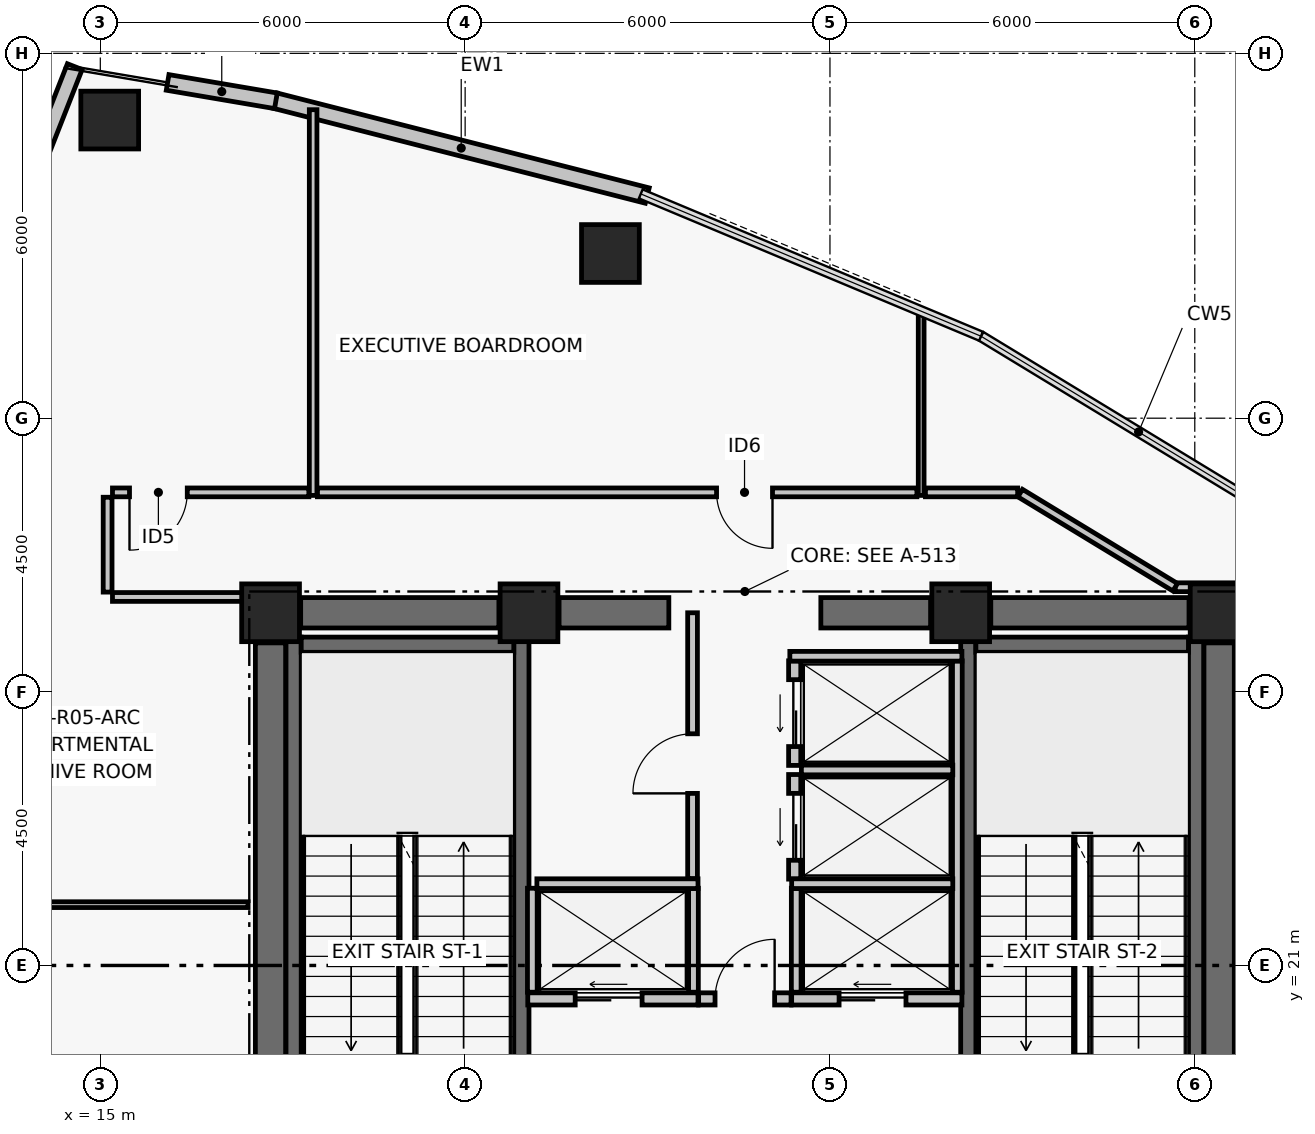
"""IFC4 building model, lengths in metres.
Left out: names, types, materials, properties, quantities, classifications, styles, units other than length and angle.
Written with IfcOpenShell. Run it as: python <this file> out.ifc"""

import sys

from ifc_helpers import new_model, si_unit, direction, frame, frame_2d, origin, origin_2d, place, context, subcontext, project, spatial, rectangle, hollow_rectangle, extrude, element, fill, save


model = new_model("IFC4")
c1 = context("Model", 3, precision=1e-05, world=origin(), true_north=direction((0.0, 1.0)))
c2 = subcontext(c1, "Body", "Model", "MODEL_VIEW")
j1 = project(units=[si_unit("LENGTHUNIT", "METRE"), si_unit("PLANEANGLEUNIT", "RADIAN")], contexts=[c1])
p1 = place(None, origin())
s1 = spatial("IfcSite", under=j1, at=p1, CompositionType="ELEMENT")
p2 = place(p1, origin())
s2 = spatial("IfcBuilding", under=s1, at=p2, CompositionType="ELEMENT")
p3 = place(p2, frame((0.0, 0.0, 187.8)))
s3 = spatial("IfcBuildingStorey", under=s2, at=p3, CompositionType="ELEMENT", Elevation=187.8)
for number, where, z_axis, x_axis in (
    (1, (17.8, 26.8, 0.0), (0.0, 0.0, 1.0), (1.0, 0.0, 0.0)),
    (2, (22.05, 26.8, 0.0), (0.0, 0.0, 1.0), (1.0, 0.0, 0.0)),
    (3, (29.15, 26.8, 0.0), (0.0, 0.0, 1.0), (1.0, 0.0, 0.0)),
    (4, (33.4, 26.8, 0.0), (0.0, 0.0, 1.0), (1.0, 0.0, 0.0)),
):
    element("IfcColumn", number, at=place(p3, frame(where, z_axis=z_axis, x_axis=x_axis)), inside=s3, PredefinedType="COLUMN", context=c2, shape_type="SweptSolid", body=[
        extrude(rectangle(XDim=0.95, YDim=0.95, at=origin_2d()), origin(), (0.0, 0.0, 1.0), 3.72),
    ])
p4 = place(p3, frame((18.295, 26.8, 0.0), z_axis=(0.0, 0.0, 1.0), x_axis=(1.0, 0.0, 0.0)))
e5 = element("IfcWall", 5, at=p4, inside=s3, PredefinedType="SHEAR", context=c2, shape_type="SweptSolid", body=[
    extrude(rectangle(XDim=3.26, YDim=0.5, at=frame_2d((1.63, 0.0))), origin(), (0.0, 0.0, 1.0), 3.5),
])
p5 = place(p3, frame((22.545, 26.8, 0.0), z_axis=(0.0, 0.0, 1.0), x_axis=(1.0, 0.0, 0.0)))
e6 = element("IfcWall", 6, at=p5, inside=s3, PredefinedType="SHEAR", context=c2, shape_type="SweptSolid", body=[
    extrude(rectangle(XDim=1.805, YDim=0.5, at=frame_2d((0.903, 0.0))), origin(), (0.0, 0.0, 1.0), 3.5),
])
p6 = place(p3, frame((26.85, 26.8, 0.0), z_axis=(0.0, 0.0, 1.0), x_axis=(1.0, 0.0, 0.0)))
e7 = element("IfcWall", 7, at=p6, inside=s3, PredefinedType="SHEAR", context=c2, shape_type="SweptSolid", body=[
    extrude(rectangle(XDim=1.805, YDim=0.5, at=frame_2d((0.902, 0.0))), origin(), (0.0, 0.0, 1.0), 3.5),
])
p7 = place(p3, frame((29.645, 26.8, 0.0), z_axis=(0.0, 0.0, 1.0), x_axis=(1.0, 0.0, 0.0)))
e8 = element("IfcWall", 8, at=p7, inside=s3, PredefinedType="SHEAR", context=c2, shape_type="SweptSolid", body=[
    extrude(rectangle(XDim=3.26, YDim=0.5, at=frame_2d((1.63, 0.0))), origin(), (0.0, 0.0, 1.0), 3.5),
])
for number, where, z_axis, x_axis in (
    (9, (17.8, 17.695, 0.0), (0.0, 0.0, 1.0), (0.0, 1.0, 0.0)),
    (10, (33.4, 17.695, 0.0), (0.0, 0.0, 1.0), (0.0, 1.0, 0.0)),
):
    element("IfcWall", number, at=place(p3, frame(where, z_axis=z_axis, x_axis=x_axis)), inside=s3, PredefinedType="SHEAR", context=c2, shape_type="SweptSolid", body=[
        extrude(rectangle(XDim=8.61, YDim=0.5, at=frame_2d((4.305, 0.0))), origin(), (0.0, 0.0, 1.0), 3.5),
    ])
p8 = place(p3, frame((18.179, 17.6, 0.0), z_axis=(0.0, 0.0, 1.0), x_axis=(0.0, 1.0, 0.0)))
e11 = element("IfcWall", 11, at=p8, inside=s3, PredefinedType="SHEAR", context=c2, shape_type="SweptSolid", body=[
    extrude(rectangle(XDim=8.8, YDim=0.25, at=frame_2d((4.4, 0.0))), origin(), (0.0, 0.0, 1.0), 3.5),
])
p9 = place(p3, frame((21.925, 17.6, 0.0), z_axis=(0.0, 0.0, 1.0), x_axis=(0.0, 1.0, 0.0)))
e12 = element("IfcWall", 12, at=p9, inside=s3, PredefinedType="SHEAR", context=c2, shape_type="SweptSolid", body=[
    extrude(rectangle(XDim=8.8, YDim=0.25, at=frame_2d((4.4, 0.0))), origin(), (0.0, 0.0, 1.0), 3.5),
])
p10 = place(p9, frame((0.35, 0.0, 0.0)))
e13 = element("IfcOpeningElement", 13, at=p10, cuts=e12, PredefinedType="OPENING", context=c2, shape_type="SweptSolid", body=[
    extrude(rectangle(XDim=1.05, YDim=2.08, at=frame_2d((0.525, 1.04))), frame((0.0, 0.135, 0.0), z_axis=(0.0, -1.0, 0.0), x_axis=(1.0, 0.0, 0.0)), (0.0, 0.0, 1.0), 0.27),
])
p11 = place(p3, frame((18.304, 26.275, 0.0), z_axis=(0.0, 0.0, 1.0), x_axis=(1.0, 0.0, 0.0)))
e14 = element("IfcWall", 14, at=p11, inside=s3, PredefinedType="SHEAR", context=c2, shape_type="SweptSolid", body=[
    extrude(rectangle(XDim=3.496, YDim=0.25, at=frame_2d((1.748, 0.0))), origin(), (0.0, 0.0, 1.0), 3.5),
])
p12 = place(p3, frame((29.275, 17.6, 0.0), z_axis=(0.0, 0.0, 1.0), x_axis=(0.0, 1.0, 0.0)))
e15 = element("IfcWall", 15, at=p12, inside=s3, PredefinedType="SHEAR", context=c2, shape_type="SweptSolid", body=[
    extrude(rectangle(XDim=8.8, YDim=0.25, at=frame_2d((4.4, 0.0))), origin(), (0.0, 0.0, 1.0), 3.5),
])
p13 = place(p12, frame((0.35, 0.0, 0.0)))
e16 = element("IfcOpeningElement", 16, at=p13, cuts=e15, PredefinedType="OPENING", context=c2, shape_type="SweptSolid", body=[
    extrude(rectangle(XDim=1.05, YDim=2.08, at=frame_2d((0.525, 1.04))), frame((0.0, 0.135, 0.0), z_axis=(0.0, -1.0, 0.0), x_axis=(1.0, 0.0, 0.0)), (0.0, 0.0, 1.0), 0.27),
])
p14 = place(p3, frame((33.021, 17.6, 0.0), z_axis=(0.0, 0.0, 1.0), x_axis=(0.0, 1.0, 0.0)))
e17 = element("IfcWall", 17, at=p14, inside=s3, PredefinedType="SHEAR", context=c2, shape_type="SweptSolid", body=[
    extrude(rectangle(XDim=8.8, YDim=0.25, at=frame_2d((4.4, 0.0))), origin(), (0.0, 0.0, 1.0), 3.5),
])
p15 = place(p3, frame((29.4, 26.275, 0.0), z_axis=(0.0, 0.0, 1.0), x_axis=(1.0, 0.0, 0.0)))
e18 = element("IfcWall", 18, at=p15, inside=s3, PredefinedType="SHEAR", context=c2, shape_type="SweptSolid", body=[
    extrude(rectangle(XDim=3.496, YDim=0.25, at=frame_2d((1.748, 0.0))), origin(), (0.0, 0.0, 1.0), 3.5),
])
for number, where, z_axis, x_axis in (
    (19, (23.389, 32.708, 0.0), (0.0, 0.0, 1.0), (1.0, 0.0, 0.0)),
    (20, (15.155, 34.903, 0.0), (0.0, 0.0, 1.0), (1.0, 0.0, 0.0)),
):
    element("IfcColumn", number, at=place(p3, frame(where, z_axis=z_axis, x_axis=x_axis)), inside=s3, PredefinedType="COLUMN", context=c2, shape_type="SweptSolid", body=[
        extrude(hollow_rectangle(XDim=0.95, YDim=0.95, WallThickness=0.04, at=origin_2d()), origin(), (0.0, 0.0, 1.0), 3.72),
    ])
p16 = place(p3, frame((17.876, 35.222, 0.0), z_axis=(0.0, 0.0, 1.0), x_axis=(0.968976240439, -0.247153890246, 0.0)))
e21 = element("IfcWall", 21, at=p16, inside=s3, PredefinedType="PARTITIONING", context=c2, shape_type="SweptSolid", body=[
    extrude(rectangle(XDim=6.315, YDim=0.26, at=frame_2d((3.157, 0.0))), origin(), (0.0, 0.0, 1.0), 3.5),
])
p17 = place(p3, frame((16.107, 35.522, 0.0), z_axis=(0.0, 0.0, 1.0), x_axis=(0.985877723898, -0.167466753484, 0.0)))
e22 = element("IfcWall", 22, at=p17, inside=s3, PredefinedType="PARTITIONING", context=c2, shape_type="SweptSolid", body=[
    extrude(rectangle(XDim=1.806, YDim=0.26, at=frame_2d((0.903, 0.0))), origin(), (0.0, 0.0, 1.0), 3.5),
])
p18 = place(p3, frame((13.479, 32.979, 0.0), z_axis=(0.0, 0.0, 1.0), x_axis=(0.365609724313, 0.930768246927, 0.0)))
e23 = element("IfcWall", 23, at=p18, inside=s3, PredefinedType="PARTITIONING", context=c2, shape_type="SweptSolid", body=[
    extrude(rectangle(XDim=3.011, YDim=0.26, at=frame_2d((1.505, 0.0))), origin(), (0.0, 0.0, 1.0), 3.5),
])
p19 = place(p3, frame((24.84, 20.45, 0.0), z_axis=(0.0, 0.0, 1.0), x_axis=(1.0, 0.0, 0.0)))
e24 = element("IfcWall", 24, at=p19, inside=s3, PredefinedType="PARTITIONING", context=c2, shape_type="SweptSolid", body=[
    extrude(rectangle(XDim=1.52, YDim=0.2, at=frame_2d((0.76, 0.0))), origin(), (0.0, 0.0, 1.0), 3.5),
])
p20 = place(p19, frame((0.27, 0.0, 0.0)))
e25 = element("IfcOpeningElement", 25, at=p20, cuts=e24, PredefinedType="OPENING", context=c2, shape_type="SweptSolid", body=[
    extrude(rectangle(XDim=0.98, YDim=2.06, at=frame_2d((0.49, 1.03))), frame((0.0, 0.11, 0.0), z_axis=(0.0, -1.0, 0.0), x_axis=(1.0, 0.0, 0.0)), (0.0, 0.0, 1.0), 0.22),
])
p21 = place(p3, frame((22.03, 20.45, 0.0), z_axis=(0.0, 0.0, 1.0), x_axis=(1.0, 0.0, 0.0)))
e26 = element("IfcWall", 26, at=p21, inside=s3, PredefinedType="PARTITIONING", context=c2, shape_type="SweptSolid", body=[
    extrude(rectangle(XDim=2.8, YDim=0.2, at=frame_2d((1.4, 0.0))), origin(), (0.0, 0.0, 1.0), 3.5),
])
p22 = place(p21, frame((0.78, 0.0, 0.0)))
e27 = element("IfcOpeningElement", 27, at=p22, cuts=e26, PredefinedType="OPENING", context=c2, shape_type="SweptSolid", body=[
    extrude(rectangle(XDim=1.1, YDim=2.08, at=frame_2d((0.55, 1.04))), frame((0.0, 0.11, 0.0), z_axis=(0.0, -1.0, 0.0), x_axis=(1.0, 0.0, 0.0)), (0.0, 0.0, 1.0), 0.22),
])
p23 = place(p3, frame((26.37, 20.45, 0.0), z_axis=(0.0, 0.0, 1.0), x_axis=(1.0, 0.0, 0.0)))
e28 = element("IfcWall", 28, at=p23, inside=s3, PredefinedType="PARTITIONING", context=c2, shape_type="SweptSolid", body=[
    extrude(rectangle(XDim=2.8, YDim=0.2, at=frame_2d((1.4, 0.0))), origin(), (0.0, 0.0, 1.0), 3.5),
])
p24 = place(p23, frame((0.78, 0.0, 0.0)))
e29 = element("IfcOpeningElement", 29, at=p24, cuts=e28, PredefinedType="OPENING", context=c2, shape_type="SweptSolid", body=[
    extrude(rectangle(XDim=1.1, YDim=2.08, at=frame_2d((0.55, 1.04))), frame((0.0, 0.11, 0.0), z_axis=(0.0, -1.0, 0.0), x_axis=(1.0, 0.0, 0.0)), (0.0, 0.0, 1.0), 0.22),
])
p25 = place(p3, frame((26.42, 22.42, 0.0), z_axis=(0.0, 0.0, 1.0), x_axis=(0.0, 1.0, 0.0)))
e30 = element("IfcWall", 30, at=p25, inside=s3, PredefinedType="PARTITIONING", context=c2, shape_type="SweptSolid", body=[
    extrude(rectangle(XDim=1.72, YDim=0.2, at=frame_2d((0.86, 0.0))), origin(), (0.0, 0.0, 1.0), 3.5),
])
p26 = place(p25, frame((0.31, 0.0, 0.0)))
e31 = element("IfcOpeningElement", 31, at=p26, cuts=e30, PredefinedType="OPENING", context=c2, shape_type="SweptSolid", body=[
    extrude(rectangle(XDim=1.1, YDim=2.08, at=frame_2d((0.55, 1.04))), frame((0.0, 0.11, 0.0), z_axis=(0.0, -1.0, 0.0), x_axis=(1.0, 0.0, 0.0)), (0.0, 0.0, 1.0), 0.22),
])
p27 = place(p3, frame((26.42, 24.29, 0.0), z_axis=(0.0, 0.0, 1.0), x_axis=(0.0, 1.0, 0.0)))
e32 = element("IfcWall", 32, at=p27, inside=s3, PredefinedType="PARTITIONING", context=c2, shape_type="SweptSolid", body=[
    extrude(rectangle(XDim=1.72, YDim=0.2, at=frame_2d((0.86, 0.0))), origin(), (0.0, 0.0, 1.0), 3.5),
])
p28 = place(p27, frame((0.31, 0.0, 0.0)))
e33 = element("IfcOpeningElement", 33, at=p28, cuts=e32, PredefinedType="OPENING", context=c2, shape_type="SweptSolid", body=[
    extrude(rectangle(XDim=1.1, YDim=2.08, at=frame_2d((0.55, 1.04))), frame((0.0, 0.11, 0.0), z_axis=(0.0, -1.0, 0.0), x_axis=(1.0, 0.0, 0.0)), (0.0, 0.0, 1.0), 0.22),
])
for number, where, z_axis, x_axis in (
    (34, (22.105, 20.56, 0.0), (0.0, 0.0, 1.0), (0.0, 1.0, 0.0)),
    (35, (24.755, 20.56, 0.0), (0.0, 0.0, 1.0), (0.0, 1.0, 0.0)),
):
    element("IfcWall", number, at=place(p3, frame(where, z_axis=z_axis, x_axis=x_axis)), inside=s3, PredefinedType="PARTITIONING", context=c2, shape_type="SweptSolid", body=[
        extrude(rectangle(XDim=1.71, YDim=0.16, at=frame_2d((0.855, 0.0))), origin(), (0.0, 0.0, 1.0), 3.5),
    ])
p29 = place(p3, frame((22.18, 22.345, 0.0), z_axis=(0.0, 0.0, 1.0), x_axis=(1.0, 0.0, 0.0)))
e36 = element("IfcWall", 36, at=p29, inside=s3, PredefinedType="PARTITIONING", context=c2, shape_type="SweptSolid", body=[
    extrude(rectangle(XDim=2.65, YDim=0.16, at=frame_2d((1.325, 0.0))), origin(), (0.0, 0.0, 1.0), 3.5),
])
p30 = place(p3, frame((29.095, 20.56, 0.0), z_axis=(0.0, 0.0, 1.0), x_axis=(0.0, 1.0, 0.0)))
e37 = element("IfcWall", 37, at=p30, inside=s3, PredefinedType="PARTITIONING", context=c2, shape_type="SweptSolid", body=[
    extrude(rectangle(XDim=5.45, YDim=0.16, at=frame_2d((2.725, 0.0))), origin(), (0.0, 0.0, 1.0), 3.5),
])
p31 = place(p3, frame((26.445, 20.56, 0.0), z_axis=(0.0, 0.0, 1.0), x_axis=(0.0, 1.0, 0.0)))
e38 = element("IfcWall", 38, at=p31, inside=s3, PredefinedType="PARTITIONING", context=c2, shape_type="SweptSolid", body=[
    extrude(rectangle(XDim=1.71, YDim=0.16, at=frame_2d((0.855, 0.0))), origin(), (0.0, 0.0, 1.0), 3.5),
])
p32 = place(p3, frame((26.37, 22.345, 0.0), z_axis=(0.0, 0.0, 1.0), x_axis=(1.0, 0.0, 0.0)))
e39 = element("IfcWall", 39, at=p32, inside=s3, PredefinedType="PARTITIONING", context=c2, shape_type="SweptSolid", body=[
    extrude(rectangle(XDim=2.65, YDim=0.16, at=frame_2d((1.325, 0.0))), origin(), (0.0, 0.0, 1.0), 3.5),
])
p33 = place(p3, frame((26.53, 24.215, 0.0), z_axis=(0.0, 0.0, 1.0), x_axis=(1.0, 0.0, 0.0)))
e40 = element("IfcWall", 40, at=p33, inside=s3, PredefinedType="PARTITIONING", context=c2, shape_type="SweptSolid", body=[
    extrude(rectangle(XDim=2.49, YDim=0.16, at=frame_2d((1.245, 0.0))), origin(), (0.0, 0.0, 1.0), 3.5),
])
p34 = place(p3, frame((26.34, 26.085, 0.0), z_axis=(0.0, 0.0, 1.0), x_axis=(1.0, 0.0, 0.0)))
e41 = element("IfcWall", 41, at=p34, inside=s3, PredefinedType="PARTITIONING", context=c2, shape_type="SweptSolid", body=[
    extrude(rectangle(XDim=2.83, YDim=0.16, at=frame_2d((1.415, 0.0))), origin(), (0.0, 0.0, 1.0), 3.5),
])
p35 = place(p3, frame((24.74, 22.43, 0.0), z_axis=(0.0, 0.0, 1.0), x_axis=(0.0, 1.0, 0.0)))
e42 = element("IfcWall", 42, at=p35, inside=s3, PredefinedType="PARTITIONING", context=c2, shape_type="SweptSolid", body=[
    extrude(rectangle(XDim=4.37, YDim=0.16, at=frame_2d((2.185, 0.0))), origin(), (0.0, 0.0, 1.0), 2.63),
])
p36 = place(p35, frame((1.4, 0.0, 0.0)))
e43 = element("IfcOpeningElement", 43, at=p36, cuts=e42, PredefinedType="OPENING", context=c2, shape_type="SweptSolid", body=[
    extrude(rectangle(XDim=0.98, YDim=2.06, at=frame_2d((0.49, 1.03))), frame((0.0, 0.09, 0.0), z_axis=(0.0, -1.0, 0.0), x_axis=(1.0, 0.0, 0.0)), (0.0, 0.0, 1.0), 0.18),
])
p37 = place(p3, frame((33.74, 27.22, 0.0), z_axis=(0.0, 0.0, 1.0), x_axis=(-1.0, 0.0, 0.0)))
e44 = element("IfcWall", 44, at=p37, inside=s3, PredefinedType="PARTITIONING", context=c2, shape_type="SweptSolid", body=[
    extrude(rectangle(XDim=1.062, YDim=0.145, at=frame_2d((0.531, 0.0))), origin(), (0.0, 0.0, 1.0), 2.63),
])
p38 = place(p3, frame((32.677, 27.22, 0.0), z_axis=(0.0, 0.0, 1.0), x_axis=(-0.854662977584, 0.519183199601, 0.0)))
e45 = element("IfcWall", 45, at=p38, inside=s3, PredefinedType="PARTITIONING", context=c2, shape_type="SweptSolid", body=[
    extrude(rectangle(XDim=2.982, YDim=0.145, at=frame_2d((1.491, 0.0))), origin(), (0.0, 0.0, 1.0), 2.63),
])
p39 = place(p3, frame((30.087, 28.78, 0.0), z_axis=(0.0, 0.0, 1.0), x_axis=(-1.0, 0.0, 0.0)))
e46 = element("IfcWall", 46, at=p39, inside=s3, PredefinedType="PARTITIONING", context=c2, shape_type="SweptSolid", body=[
    extrude(rectangle(XDim=1.517, YDim=0.145, at=frame_2d((0.759, 0.0))), origin(), (0.0, 0.0, 1.0), 2.93),
])
p40 = place(p3, frame((28.43, 28.78, 0.0), z_axis=(0.0, 0.0, 1.0), x_axis=(-1.0, 0.0, 0.0)))
e47 = element("IfcWall", 47, at=p40, inside=s3, PredefinedType="PARTITIONING", context=c2, shape_type="SweptSolid", body=[
    extrude(rectangle(XDim=9.86, YDim=0.145, at=frame_2d((4.93, 0.0))), origin(), (0.0, 0.0, 1.0), 2.73),
])
p41 = place(p40, frame((2.375, 0.0, 0.0)))
e48 = element("IfcOpeningElement", 48, at=p41, cuts=e47, PredefinedType="OPENING", context=c2, shape_type="SweptSolid", body=[
    extrude(rectangle(XDim=0.92, YDim=2.05, at=frame_2d((0.46, 1.025))), frame((0.0, 0.083, 0.0), z_axis=(0.0, -1.0, 0.0), x_axis=(1.0, 0.0, 0.0)), (0.0, 0.0, 1.0), 0.165),
])
p42 = place(p3, frame((18.43, 28.78, 0.0), z_axis=(0.0, 0.0, 1.0), x_axis=(-1.0, 0.0, 0.0)))
e49 = element("IfcWall", 49, at=p42, inside=s3, PredefinedType="PARTITIONING", context=c2, shape_type="SweptSolid", body=[
    extrude(rectangle(XDim=3.23, YDim=0.145, at=frame_2d((1.615, 0.0))), origin(), (0.0, 0.0, 1.0), 2.73),
])
p43 = place(p42, frame((2.0, 0.0, 0.0)))
e50 = element("IfcOpeningElement", 50, at=p43, cuts=e49, PredefinedType="OPENING", context=c2, shape_type="SweptSolid", body=[
    extrude(rectangle(XDim=0.95, YDim=2.06, at=frame_2d((0.475, 1.03))), frame((0.0, 0.083, 0.0), z_axis=(0.0, -1.0, 0.0), x_axis=(1.0, 0.0, 0.0)), (0.0, 0.0, 1.0), 0.165),
])
p44 = place(p3, frame((15.12, 28.7, 0.0), z_axis=(0.0, 0.0, 1.0), x_axis=(0.0, -1.0, 0.0)))
e51 = element("IfcWall", 51, at=p44, inside=s3, PredefinedType="PARTITIONING", context=c2, shape_type="SweptSolid", body=[
    extrude(rectangle(XDim=1.56, YDim=0.145, at=frame_2d((0.78, 0.0))), origin(), (0.0, 0.0, 1.0), 2.73),
])
p45 = place(p3, frame((15.2, 27.06, 0.0), z_axis=(0.0, 0.0, 1.0), x_axis=(1.0, 0.0, 0.0)))
e52 = element("IfcWall", 52, at=p45, inside=s3, PredefinedType="PARTITIONING", context=c2, shape_type="SweptSolid", body=[
    extrude(rectangle(XDim=2.18, YDim=0.145, at=frame_2d((1.09, 0.0))), origin(), (0.0, 0.0, 1.0), 2.73),
])
p46 = place(p3, frame((18.5, 28.73, 0.0), z_axis=(0.0, 0.0, 1.0), x_axis=(0.0, 1.0, 0.0)))
e53 = element("IfcWall", 53, at=p46, inside=s3, PredefinedType="PARTITIONING", context=c2, shape_type="SweptSolid", body=[
    extrude(rectangle(XDim=6.343, YDim=0.125, at=frame_2d((3.172, 0.0))), origin(), (0.0, 0.0, 1.0), 2.93),
])
p47 = place(p3, frame((28.5, 28.73, 0.0), z_axis=(0.0, 0.0, 1.0), x_axis=(0.0, 1.0, 0.0)))
e54 = element("IfcWall", 54, at=p47, inside=s3, PredefinedType="PARTITIONING", context=c2, shape_type="SweptSolid", body=[
    extrude(rectangle(XDim=3.041, YDim=0.095, at=frame_2d((1.52, 0.0))), origin(), (0.0, 0.0, 1.0), 2.93),
])
p48 = place(p3, frame((11.822, 22.0, 0.0), z_axis=(0.0, 0.0, 1.0), x_axis=(1.0, 0.0, 0.0)))
e55 = element("IfcWall", 55, at=p48, inside=s3, PredefinedType="PARTITIONING", context=c2, shape_type="SweptSolid", body=[
    extrude(rectangle(XDim=5.608, YDim=0.095, at=frame_2d((2.804, 0.0))), origin(), (0.0, 0.0, 1.0), 2.63),
])
p49 = place(p20, origin())
e56 = element("IfcDoor", 56, at=p49, inside=s3, OperationType="SINGLE_SWING_RIGHT", PredefinedType="DOOR", context=c2, shape_type="SweptSolid", body=[
    extrude(rectangle(XDim=0.98, YDim=2.06, at=frame_2d((0.49, 1.03))), frame((0.0, 0.025, 0.0), z_axis=(0.0, -1.0, 0.0), x_axis=(1.0, 0.0, 0.0)), (0.0, 0.0, 1.0), 0.05),
])
fill(e25, e56)
p50 = place(p22, origin())
e57 = element("IfcDoor", 57, at=p50, inside=s3, OperationType="DOUBLE_DOOR_SLIDING", PredefinedType="DOOR", context=c2, shape_type="SweptSolid", body=[
    extrude(rectangle(XDim=1.1, YDim=2.08, at=frame_2d((0.55, 1.04))), frame((0.0, 0.025, 0.0), z_axis=(0.0, -1.0, 0.0), x_axis=(1.0, 0.0, 0.0)), (0.0, 0.0, 1.0), 0.05),
])
fill(e27, e57)
p51 = place(p24, origin())
e58 = element("IfcDoor", 58, at=p51, inside=s3, OperationType="DOUBLE_DOOR_SLIDING", PredefinedType="DOOR", context=c2, shape_type="SweptSolid", body=[
    extrude(rectangle(XDim=1.1, YDim=2.08, at=frame_2d((0.55, 1.04))), frame((0.0, 0.025, 0.0), z_axis=(0.0, -1.0, 0.0), x_axis=(1.0, 0.0, 0.0)), (0.0, 0.0, 1.0), 0.05),
])
fill(e29, e58)
p52 = place(p26, origin())
e59 = element("IfcDoor", 59, at=p52, inside=s3, OperationType="DOUBLE_DOOR_SLIDING", PredefinedType="DOOR", context=c2, shape_type="SweptSolid", body=[
    extrude(rectangle(XDim=1.1, YDim=2.08, at=frame_2d((0.55, 1.04))), frame((0.0, 0.025, 0.0), z_axis=(0.0, -1.0, 0.0), x_axis=(1.0, 0.0, 0.0)), (0.0, 0.0, 1.0), 0.05),
])
fill(e31, e59)
p53 = place(p28, origin())
e60 = element("IfcDoor", 60, at=p53, inside=s3, OperationType="DOUBLE_DOOR_SLIDING", PredefinedType="DOOR", context=c2, shape_type="SweptSolid", body=[
    extrude(rectangle(XDim=1.1, YDim=2.08, at=frame_2d((0.55, 1.04))), frame((0.0, 0.025, 0.0), z_axis=(0.0, -1.0, 0.0), x_axis=(1.0, 0.0, 0.0)), (0.0, 0.0, 1.0), 0.05),
])
fill(e33, e60)
p54 = place(p36, origin())
e61 = element("IfcDoor", 61, at=p54, inside=s3, OperationType="SINGLE_SWING_LEFT", PredefinedType="DOOR", context=c2, shape_type="SweptSolid", body=[
    extrude(rectangle(XDim=0.98, YDim=2.06, at=frame_2d((0.49, 1.03))), frame((0.0, 0.025, 0.0), z_axis=(0.0, -1.0, 0.0), x_axis=(1.0, 0.0, 0.0)), (0.0, 0.0, 1.0), 0.05),
])
fill(e43, e61)
p55 = place(p41, origin())
e62 = element("IfcDoor", 62, at=p55, inside=s3, OperationType="SINGLE_SWING_LEFT", PredefinedType="DOOR", context=c2, shape_type="SweptSolid", body=[
    extrude(rectangle(XDim=0.92, YDim=2.05, at=frame_2d((0.46, 1.025))), frame((0.0, 0.025, 0.0), z_axis=(0.0, -1.0, 0.0), x_axis=(1.0, 0.0, 0.0)), (0.0, 0.0, 1.0), 0.05),
])
fill(e48, e62)
p56 = place(p43, origin())
e63 = element("IfcDoor", 63, at=p56, inside=s3, OperationType="SINGLE_SWING_RIGHT", PredefinedType="DOOR", context=c2, shape_type="SweptSolid", body=[
    extrude(rectangle(XDim=0.95, YDim=2.06, at=frame_2d((0.475, 1.03))), frame((0.0, 0.025, 0.0), z_axis=(0.0, -1.0, 0.0), x_axis=(1.0, 0.0, 0.0)), (0.0, 0.0, 1.0), 0.05),
])
fill(e50, e63)
save(model, sys.argv[1])
